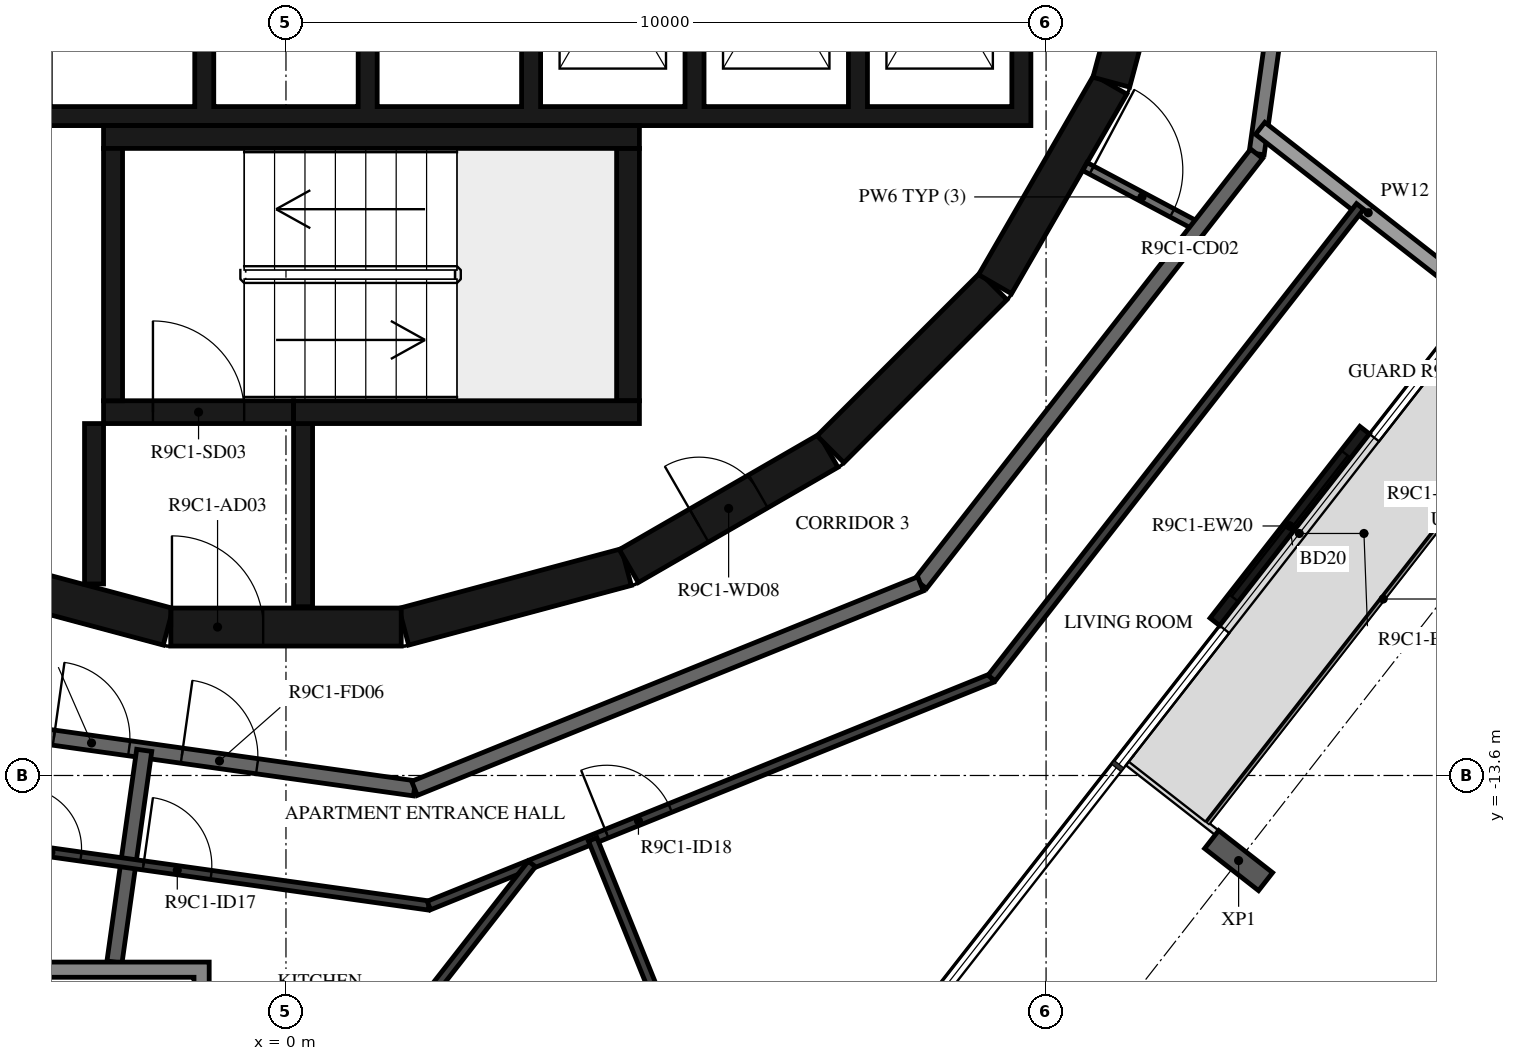
"""IFC4 building model, lengths in metres.
Left out: names, types, materials, properties, quantities, classifications, styles, units other than length and angle.
Written with IfcOpenShell. Run it as: python <this file> out.ifc"""

import sys

from ifc_helpers import new_model, si_unit, direction, frame, frame_2d, origin, origin_2d, place, context, subcontext, project, spatial, polyline, rectangle, i_section, outline, extrude, element, fill, save


model = new_model("IFC4")
c1 = context("Model", 3, precision=1e-05, world=origin(), true_north=direction((0.0, 1.0)))
c2 = subcontext(c1, "Body", "Model", "MODEL_VIEW")
j1 = project(units=[si_unit("LENGTHUNIT", "METRE"), si_unit("PLANEANGLEUNIT", "RADIAN")], contexts=[c1])
p1 = place(None, origin())
s1 = spatial("IfcSite", under=j1, at=p1, CompositionType="ELEMENT")
p2 = place(p1, origin())
s2 = spatial("IfcBuilding", under=s1, at=p2, CompositionType="ELEMENT")
p3 = place(p2, frame((0.0, 0.0, 357.5)))
s3 = spatial("IfcBuildingStorey", under=s2, at=p3, CompositionType="ELEMENT", Elevation=357.5)
p4 = place(p3, frame((12.533, -14.719, -0.38), z_axis=(0.0, 0.0, 1.0), x_axis=(-0.615661060634, -0.788011077599, 0.0)))
e1 = element("IfcColumn", 1, at=p4, inside=s3, PredefinedType="COLUMN", context=c2, shape_type="SweptSolid", body=[
    extrude(i_section(OverallWidth=0.3, OverallDepth=0.9, WebThickness=0.019, FlangeThickness=0.035, FilletRadius=0.03, at=origin_2d()), origin(), (0.0, 0.0, 1.0), 3.5),
])
p5 = place(p3, frame((12.221, -11.578, 0.0), z_axis=(0.0, 0.0, 1.0), x_axis=(0.615666248856, 0.788007024093, 0.0)))
e2 = element("IfcWall", 2, at=p5, inside=s3, PredefinedType="STANDARD", context=c2, shape_type="SweptSolid", body=[
    extrude(rectangle(XDim=3.2, YDim=0.16, at=frame_2d((1.6, 0.0))), origin(), (0.0, 0.0, 1.0), 3.12),
])
p6 = place(p5, frame((0.4, 0.0, 0.0)))
e3 = element("IfcOpeningElement", 3, at=p6, cuts=e2, PredefinedType="OPENING", context=c2, shape_type="SweptSolid", body=[
    extrude(rectangle(XDim=2.4, YDim=2.4, at=frame_2d((1.2, 1.2))), frame((0.0, 0.09, 0.0), z_axis=(0.0, -1.0, 0.0), x_axis=(1.0, 0.0, 0.0)), (0.0, 0.0, 1.0), 0.18),
])
p7 = place(p3, frame((1.55, -11.643, 0.0), z_axis=(0.0, 0.0, 1.0), x_axis=(0.965948410781, 0.258734743916, 0.0)))
e4 = element("IfcWall", 4, at=p7, inside=s3, PredefinedType="SHEAR", context=c2, shape_type="SweptSolid", body=[
    extrude(rectangle(XDim=3.033, YDim=0.5, at=frame_2d((1.516, 0.0))), origin(), (0.0, 0.0, 1.0), 3.12),
])
p8 = place(p3, frame((4.51, -10.845, 0.0), z_axis=(0.0, 0.0, 1.0), x_axis=(0.865975092491, 0.500087131594, 0.0)))
e5 = element("IfcWall", 5, at=p8, inside=s3, PredefinedType="SHEAR", context=c2, shape_type="SweptSolid", body=[
    extrude(rectangle(XDim=3.033, YDim=0.5, at=frame_2d((1.516, 0.0))), origin(), (0.0, 0.0, 1.0), 3.12),
])
p9 = place(p8, frame((1.066, 0.0, 0.0)))
e6 = element("IfcOpeningElement", 6, at=p9, cuts=e5, PredefinedType="OPENING", context=c2, shape_type="SweptSolid", body=[
    extrude(rectangle(XDim=0.9, YDim=2.1, at=frame_2d((0.45, 1.05))), frame((0.0, 0.26, 0.0), z_axis=(0.0, -1.0, 0.0), x_axis=(1.0, 0.0, 0.0)), (0.0, 0.0, 1.0), 0.52),
])
p10 = place(p3, frame((7.164, -9.308, 0.0), z_axis=(0.0, 0.0, 1.0), x_axis=(0.707106781187, 0.707106781187, 0.0)))
e7 = element("IfcWall", 7, at=p10, inside=s3, PredefinedType="SHEAR", context=c2, shape_type="SweptSolid", body=[
    extrude(rectangle(XDim=3.032, YDim=0.5, at=frame_2d((1.516, 0.0))), origin(), (0.0, 0.0, 1.0), 3.12),
])
for number, where, z_axis, x_axis in (
    (8, (9.329, -7.137, 0.0), (0.0, 0.0, 1.0), (0.5, 0.866, 0.0)),
    (9, (10.858, -4.479, 0.0), (0.0, 0.0, 1.0), (0.259, 0.966, 0.0)),
    (10, (-4.479, -10.858, 0.0), (0.0, 0.0, 1.0), (0.966, -0.259, 0.0)),
):
    element("IfcWall", number, at=place(p3, frame(where, z_axis=z_axis, x_axis=x_axis)), inside=s3, PredefinedType="SHEAR", context=c2, shape_type="SweptSolid", body=[
        extrude(rectangle(XDim=3.033, YDim=0.5, at=frame_2d((1.516, 0.0))), origin(), (0.0, 0.0, 1.0), 3.12),
    ])
p11 = place(p3, frame((-1.516, -11.647, 0.0), z_axis=(0.0, 0.0, 1.0), x_axis=(1.0, 0.0, 0.0)))
e11 = element("IfcWall", 11, at=p11, inside=s3, PredefinedType="SHEAR", context=c2, shape_type="SweptSolid", body=[
    extrude(rectangle(XDim=3.033, YDim=0.5, at=frame_2d((1.516, 0.0))), origin(), (0.0, 0.0, 1.0), 3.12),
])
p12 = place(p11, frame((0.016, 0.0, 0.0)))
e12 = element("IfcOpeningElement", 12, at=p12, cuts=e11, PredefinedType="OPENING", context=c2, shape_type="SweptSolid", body=[
    extrude(rectangle(XDim=1.2, YDim=2.1, at=frame_2d((0.6, 1.05))), frame((0.0, 0.26, 0.0), z_axis=(0.0, -1.0, 0.0), x_axis=(1.0, 0.0, 0.0)), (0.0, 0.0, 1.0), 0.52),
])
p13 = place(p3, frame((-2.275, -8.67, 0.0), z_axis=(0.0, 0.0, 1.0), x_axis=(0.0, 1.0, 0.0)))
e13 = element("IfcWall", 13, at=p13, inside=s3, PredefinedType="SHEAR", context=c2, shape_type="SweptSolid", body=[
    extrude(rectangle(XDim=3.32, YDim=0.25, at=frame_2d((1.66, 0.0))), origin(), (0.0, 0.0, 1.0), 3.12),
])
p14 = place(p3, frame((-2.4, -5.2, 0.0), z_axis=(0.0, 0.0, 1.0), x_axis=(1.0, 0.0, 0.0)))
e14 = element("IfcWall", 14, at=p14, inside=s3, PredefinedType="SHEAR", context=c2, shape_type="SweptSolid", body=[
    extrude(rectangle(XDim=7.05, YDim=0.3, at=frame_2d((3.525, 0.0))), origin(), (0.0, 0.0, 1.0), 3.12),
])
p15 = place(p3, frame((4.5, -8.67, 0.0), z_axis=(0.0, 0.0, 1.0), x_axis=(0.0, 1.0, 0.0)))
e15 = element("IfcWall", 15, at=p15, inside=s3, PredefinedType="SHEAR", context=c2, shape_type="SweptSolid", body=[
    extrude(rectangle(XDim=3.32, YDim=0.3, at=frame_2d((1.66, 0.0))), origin(), (0.0, 0.0, 1.0), 3.12),
])
p16 = place(p3, frame((0.1, -8.82, 0.0), z_axis=(0.0, 0.0, 1.0), x_axis=(1.0, 0.0, 0.0)))
e16 = element("IfcWall", 16, at=p16, inside=s3, PredefinedType="SHEAR", context=c2, shape_type="SweptSolid", body=[
    extrude(rectangle(XDim=4.55, YDim=0.3, at=frame_2d((2.275, 0.0))), origin(), (0.0, 0.0, 1.0), 3.12),
])
p17 = place(p3, frame((-2.4, -8.82, 0.0), z_axis=(0.0, 0.0, 1.0), x_axis=(1.0, 0.0, 0.0)))
e17 = element("IfcWall", 17, at=p17, inside=s3, PredefinedType="SHEAR", context=c2, shape_type="SweptSolid", body=[
    extrude(rectangle(XDim=2.5, YDim=0.3, at=frame_2d((1.25, 0.0))), origin(), (0.0, 0.0, 1.0), 3.12),
])
p18 = place(p17, frame((0.65, 0.0, 0.0)))
e18 = element("IfcOpeningElement", 18, at=p18, cuts=e17, PredefinedType="OPENING", context=c2, shape_type="SweptSolid", body=[
    extrude(rectangle(XDim=1.2, YDim=2.1, at=frame_2d((0.6, 1.05))), frame((0.0, 0.16, 0.0), z_axis=(0.0, -1.0, 0.0), x_axis=(1.0, 0.0, 0.0)), (0.0, 0.0, 1.0), 0.32),
])
p19 = place(p3, frame((-2.525, -8.97, 0.0), z_axis=(0.0, 0.0, 1.0), x_axis=(0.0, -1.0, 0.0)))
e19 = element("IfcWall", 19, at=p19, inside=s3, PredefinedType="SHEAR", context=c2, shape_type="SweptSolid", body=[
    extrude(rectangle(XDim=2.11, YDim=0.25, at=frame_2d((1.055, 0.0))), origin(), (0.0, 0.0, 1.0), 3.12),
])
p20 = place(p3, frame((0.225, -8.97, 0.0), z_axis=(0.0, 0.0, 1.0), x_axis=(0.0, -1.0, 0.0)))
e20 = element("IfcWall", 20, at=p20, inside=s3, PredefinedType="SHEAR", context=c2, shape_type="SweptSolid", body=[
    extrude(rectangle(XDim=2.41, YDim=0.25, at=frame_2d((1.205, 0.0))), origin(), (0.0, 0.0, 1.0), 3.12),
])
p21 = place(p3, origin())
e21 = element("IfcWall", 21, at=p21, inside=s3, PredefinedType="SHEAR", context=c2, shape_type="SweptSolid", body=[
    extrude(outline(polyline([(9.8, -5.05), (9.8, -4.8), (9.8, -1.9), (9.55, -1.9), (9.55, -4.8), (7.65, -4.8), (7.65, -1.9), (7.4, -1.9), (7.4, -4.8), (5.5, -4.8), (5.5, -1.9), (5.25, -1.9), (5.25, -4.8), (3.35, -4.8), (3.35, -1.9), (3.1, -1.9), (3.1, -4.8), (1.2, -4.8), (1.2, -1.9), (0.95, -1.9), (0.95, -4.8), (-0.95, -4.8), (-0.95, -1.9), (-1.2, -1.9), (-1.2, -4.8), (-3.1, -4.8), (-3.1, -1.9), (-3.35, -1.9), (-3.35, -4.8), (-5.25, -4.8), (-5.25, -1.9), (-5.5, -1.9), (-5.5, -4.8), (-9.55, -4.8), (-9.55, -1.9), (-9.8, -1.9), (-9.8, -4.8), (-9.8, -5.05), (9.8, -5.05)])), origin(), (0.0, 0.0, 1.0), 3.12),
])
p22 = place(p3, frame((10.511, -5.589, 0.0), z_axis=(0.0, 0.0, 1.0), x_axis=(0.882959677414, -0.469448834337, 0.0)))
e22 = element("IfcWall", 22, at=p22, inside=s3, PredefinedType="PARTITIONING", context=c2, shape_type="SweptSolid", body=[
    extrude(rectangle(XDim=1.702, YDim=0.12, at=frame_2d((0.851, 0.0))), origin(), (0.0, 0.0, 1.0), 3.12),
])
p23 = place(p22, frame((0.1, 0.0, 0.0)))
e23 = element("IfcOpeningElement", 23, at=p23, cuts=e22, PredefinedType="OPENING", context=c2, shape_type="SweptSolid", body=[
    extrude(rectangle(XDim=1.2, YDim=2.1, at=frame_2d((0.6, 1.05))), frame((0.0, 0.07, 0.0), z_axis=(0.0, -1.0, 0.0), x_axis=(1.0, 0.0, 0.0)), (0.0, 0.0, 1.0), 0.14),
])
p24 = place(p3, frame((12.77, -5.42, 0.0), z_axis=(0.0, 0.0, 1.0), x_axis=(0.139155334385, 0.990270565508, 0.0)))
e24 = element("IfcWall", 24, at=p24, inside=s3, PredefinedType="STANDARD", context=c2, shape_type="SweptSolid", body=[
    extrude(rectangle(XDim=7.181, YDim=0.2, at=frame_2d((3.59, 0.0))), origin(), (0.0, 0.0, 1.0), 3.12),
])
p25 = place(p24, frame((2.039, 0.0, 0.0)))
e25 = element("IfcOpeningElement", 25, at=p25, cuts=e24, PredefinedType="OPENING", context=c2, shape_type="SweptSolid", body=[
    extrude(rectangle(XDim=1.8, YDim=2.1, at=frame_2d((0.9, 1.05))), frame((0.0, 0.11, 0.0), z_axis=(0.0, -1.0, 0.0), x_axis=(1.0, 0.0, 0.0)), (0.0, 0.0, 1.0), 0.22),
])
p26 = place(p3, frame((8.349, -11.079, 0.0), z_axis=(0.0, 0.0, 1.0), x_axis=(0.615669112324, 0.78800478687, 0.0)))
e26 = element("IfcWall", 26, at=p26, inside=s3, PredefinedType="STANDARD", context=c2, shape_type="SweptSolid", body=[
    extrude(rectangle(XDim=7.181, YDim=0.2, at=frame_2d((3.591, 0.0))), origin(), (0.0, 0.0, 1.0), 3.12),
])
p27 = place(p3, frame((-5.42, -12.77, 0.0), z_axis=(0.0, 0.0, 1.0), x_axis=(0.990270565508, -0.139155334385, 0.0)))
e27 = element("IfcWall", 27, at=p27, inside=s3, PredefinedType="STANDARD", context=c2, shape_type="SweptSolid", body=[
    extrude(rectangle(XDim=7.181, YDim=0.2, at=frame_2d((3.59, 0.0))), origin(), (0.0, 0.0, 1.0), 3.12),
])
p28 = place(p27, frame((2.39, 0.0, 0.0)))
e28 = element("IfcOpeningElement", 28, at=p28, cuts=e27, PredefinedType="OPENING", context=c2, shape_type="SweptSolid", body=[
    extrude(rectangle(XDim=1.0, YDim=2.1, at=frame_2d((0.5, 1.05))), frame((0.0, 0.11, 0.0), z_axis=(0.0, -1.0, 0.0), x_axis=(1.0, 0.0, 0.0)), (0.0, 0.0, 1.0), 0.22),
])
p29 = place(p27, frame((4.091, 0.0, 0.0)))
e29 = element("IfcOpeningElement", 29, at=p29, cuts=e27, PredefinedType="OPENING", context=c2, shape_type="SweptSolid", body=[
    extrude(rectangle(XDim=1.0, YDim=2.1, at=frame_2d((0.5, 1.05))), frame((0.0, 0.11, 0.0), z_axis=(0.0, -1.0, 0.0), x_axis=(1.0, 0.0, 0.0)), (0.0, 0.0, 1.0), 0.22),
])
p30 = place(p3, frame((1.691, -13.769, 0.0), z_axis=(0.0, 0.0, 1.0), x_axis=(0.92717916932, 0.374618189599, 0.0)))
e30 = element("IfcWall", 30, at=p30, inside=s3, PredefinedType="STANDARD", context=c2, shape_type="SweptSolid", body=[
    extrude(rectangle(XDim=7.181, YDim=0.2, at=frame_2d((3.591, 0.0))), origin(), (0.0, 0.0, 1.0), 3.12),
])
p31 = place(p3, frame((12.817, -5.086, 0.0), z_axis=(0.0, 0.0, 1.0), x_axis=(0.787994616725, -0.615682129034, 0.0)))
e31 = element("IfcWall", 31, at=p31, inside=s3, PredefinedType="STANDARD", context=c2, shape_type="SweptSolid", body=[
    extrude(rectangle(XDim=3.607, YDim=0.2, at=frame_2d((1.804, 0.0))), origin(), (0.0, 0.0, 1.0), 2.73),
])
p32 = place(p3, frame((-2.256, -16.055, 0.0), z_axis=(0.0, 0.0, 1.0), x_axis=(0.139148428478, 0.990271535919, 0.0)))
e32 = element("IfcWall", 32, at=p32, inside=s3, PredefinedType="STANDARD", context=c2, shape_type="SweptSolid", body=[
    extrude(rectangle(XDim=2.812, YDim=0.2, at=frame_2d((1.406, 0.0))), origin(), (0.0, 0.0, 1.0), 3.12),
])
p33 = place(p3, frame((-3.688, -14.528, 0.0), z_axis=(0.0, 0.0, 1.0), x_axis=(0.990273413633, -0.139135064782, 0.0)))
e33 = element("IfcWall", 33, at=p33, inside=s3, PredefinedType="PARTITIONING", context=c2, shape_type="SweptSolid", body=[
    extrude(rectangle(XDim=5.622, YDim=0.12, at=frame_2d((2.811, 0.0))), origin(), (0.0, 0.0, 1.0), 3.12),
])
p34 = place(p33, frame((0.2, 0.0, 0.0)))
e34 = element("IfcOpeningElement", 34, at=p34, cuts=e33, PredefinedType="OPENING", context=c2, shape_type="SweptSolid", body=[
    extrude(rectangle(XDim=0.8, YDim=2.1, at=frame_2d((0.4, 1.05))), frame((0.0, 0.07, 0.0), z_axis=(0.0, -1.0, 0.0), x_axis=(1.0, 0.0, 0.0)), (0.0, 0.0, 1.0), 0.14),
])
p35 = place(p33, frame((1.83, 0.0, 0.0)))
e35 = element("IfcOpeningElement", 35, at=p35, cuts=e33, PredefinedType="OPENING", context=c2, shape_type="SweptSolid", body=[
    extrude(rectangle(XDim=0.9, YDim=2.1, at=frame_2d((0.45, 1.05))), frame((0.0, 0.07, 0.0), z_axis=(0.0, -1.0, 0.0), x_axis=(1.0, 0.0, 0.0)), (0.0, 0.0, 1.0), 0.14),
])
p36 = place(p3, frame((1.88, -15.311, 0.0), z_axis=(0.0, 0.0, 1.0), x_axis=(0.927184866592, 0.374604088557, 0.0)))
e36 = element("IfcWall", 36, at=p36, inside=s3, PredefinedType="PARTITIONING", context=c2, shape_type="SweptSolid", body=[
    extrude(rectangle(XDim=7.985, YDim=0.12, at=frame_2d((3.993, 0.0))), origin(), (0.0, 0.0, 1.0), 3.12),
])
p37 = place(p36, frame((2.524, 0.0, 0.0)))
e37 = element("IfcOpeningElement", 37, at=p37, cuts=e36, PredefinedType="OPENING", context=c2, shape_type="SweptSolid", body=[
    extrude(rectangle(XDim=0.9, YDim=2.1, at=frame_2d((0.45, 1.05))), frame((0.0, 0.07, 0.0), z_axis=(0.0, -1.0, 0.0), x_axis=(1.0, 0.0, 0.0)), (0.0, 0.0, 1.0), 0.14),
])
p38 = place(p3, frame((9.283, -12.319, 0.0), z_axis=(0.0, 0.0, 1.0), x_axis=(0.615666903036, 0.788006512985, 0.0)))
e38 = element("IfcWall", 38, at=p38, inside=s3, PredefinedType="PARTITIONING", context=c2, shape_type="SweptSolid", body=[
    extrude(rectangle(XDim=7.875, YDim=0.12, at=frame_2d((3.938, 0.0))), origin(), (0.0, 0.0, 1.0), 3.12),
])
p39 = place(p3, frame((-0.067, -18.99, 0.0), z_axis=(0.0, 0.0, 1.0), x_axis=(0.615678487989, 0.787997461562, 0.0)))
e39 = element("IfcWall", 39, at=p39, inside=s3, PredefinedType="PARTITIONING", context=c2, shape_type="SweptSolid", body=[
    extrude(rectangle(XDim=5.364, YDim=0.12, at=frame_2d((2.682, 0.0))), origin(), (0.0, 0.0, 1.0), 3.12),
])
p40 = place(p39, frame((0.2, 0.0, 0.0)))
e40 = element("IfcOpeningElement", 40, at=p40, cuts=e39, PredefinedType="OPENING", context=c2, shape_type="SweptSolid", body=[
    extrude(rectangle(XDim=0.8, YDim=2.1, at=frame_2d((0.4, 1.05))), frame((0.0, 0.07, 0.0), z_axis=(0.0, -1.0, 0.0), x_axis=(1.0, 0.0, 0.0)), (0.0, 0.0, 1.0), 0.14),
])
p41 = place(p3, frame((6.097, -19.546, 0.0), z_axis=(0.0, 0.0, 1.0), x_axis=(-0.374591330213, 0.927190021155, 0.0)))
e41 = element("IfcWall", 41, at=p41, inside=s3, PredefinedType="PARTITIONING", context=c2, shape_type="SweptSolid", body=[
    extrude(rectangle(XDim=5.507, YDim=0.12, at=frame_2d((2.753, 0.0))), origin(), (0.0, 0.0, 1.0), 3.12),
])
p42 = place(p41, frame((0.4, 0.0, 0.0)))
e42 = element("IfcOpeningElement", 42, at=p42, cuts=e41, PredefinedType="OPENING", context=c2, shape_type="SweptSolid", body=[
    extrude(rectangle(XDim=0.9, YDim=2.1, at=frame_2d((0.45, 1.05))), frame((0.0, 0.07, 0.0), z_axis=(0.0, -1.0, 0.0), x_axis=(1.0, 0.0, 0.0)), (0.0, 0.0, 1.0), 0.14),
])
p43 = place(p3, origin())
e43 = element("IfcWall", 43, at=p43, inside=s3, PredefinedType="STANDARD", context=c2, shape_type="SweptSolid", body=[
    extrude(outline(polyline([(-1.01, -16.055), (-1.01, -18.955), (-3.91, -18.955), (-3.91, -16.055), (-1.01, -16.055)]), holes=[polyline([(-3.71, -18.755), (-1.21, -18.755), (-1.21, -16.255), (-3.71, -16.255), (-3.71, -18.755)])]), origin(), (0.0, 0.0, 1.0), 3.12),
])
p44 = place(p6, origin())
e44 = element("IfcDoor", 44, at=p44, inside=s3, OperationType="DOUBLE_DOOR_SLIDING", PredefinedType="DOOR", context=c2, shape_type="SweptSolid", body=[
    extrude(rectangle(XDim=2.4, YDim=2.4, at=frame_2d((1.2, 1.2))), frame((0.0, 0.025, 0.0), z_axis=(0.0, -1.0, 0.0), x_axis=(1.0, 0.0, 0.0)), (0.0, 0.0, 1.0), 0.05),
])
fill(e3, e44)
p45 = place(p18, origin())
e45 = element("IfcDoor", 45, at=p45, inside=s3, OperationType="SINGLE_SWING_LEFT", PredefinedType="DOOR", context=c2, shape_type="SweptSolid", body=[
    extrude(rectangle(XDim=1.2, YDim=2.1, at=frame_2d((0.6, 1.05))), frame((0.0, 0.025, 0.0), z_axis=(0.0, -1.0, 0.0), x_axis=(1.0, 0.0, 0.0)), (0.0, 0.0, 1.0), 0.05),
])
fill(e18, e45)
p46 = place(p12, origin())
e46 = element("IfcDoor", 46, at=p46, inside=s3, OperationType="SINGLE_SWING_RIGHT", PredefinedType="DOOR", context=c2, shape_type="SweptSolid", body=[
    extrude(rectangle(XDim=1.2, YDim=2.1, at=frame_2d((0.6, 1.05))), frame((0.0, 0.025, 0.0), z_axis=(0.0, -1.0, 0.0), x_axis=(1.0, 0.0, 0.0)), (0.0, 0.0, 1.0), 0.05),
])
fill(e12, e46)
p47 = place(p9, origin())
e47 = element("IfcDoor", 47, at=p47, inside=s3, OperationType="SINGLE_SWING_RIGHT", PredefinedType="DOOR", context=c2, shape_type="SweptSolid", body=[
    extrude(rectangle(XDim=0.9, YDim=2.1, at=frame_2d((0.45, 1.05))), frame((0.0, 0.025, 0.0), z_axis=(0.0, -1.0, 0.0), x_axis=(1.0, 0.0, 0.0)), (0.0, 0.0, 1.0), 0.05),
])
fill(e6, e47)
p48 = place(p28, origin())
e48 = element("IfcDoor", 48, at=p48, inside=s3, OperationType="SINGLE_SWING_RIGHT", PredefinedType="DOOR", context=c2, shape_type="SweptSolid", body=[
    extrude(rectangle(XDim=1.0, YDim=2.1, at=frame_2d((0.5, 1.05))), frame((0.0, 0.025, 0.0), z_axis=(0.0, -1.0, 0.0), x_axis=(1.0, 0.0, 0.0)), (0.0, 0.0, 1.0), 0.05),
])
fill(e28, e48)
p49 = place(p34, origin())
e49 = element("IfcDoor", 49, at=p49, inside=s3, OperationType="SINGLE_SWING_RIGHT", PredefinedType="DOOR", context=c2, shape_type="SweptSolid", body=[
    extrude(rectangle(XDim=0.8, YDim=2.1, at=frame_2d((0.4, 1.05))), frame((0.0, 0.025, 0.0), z_axis=(0.0, -1.0, 0.0), x_axis=(1.0, 0.0, 0.0)), (0.0, 0.0, 1.0), 0.05),
])
fill(e34, e49)
p50 = place(p29, origin())
e50 = element("IfcDoor", 50, at=p50, inside=s3, OperationType="SINGLE_SWING_RIGHT", PredefinedType="DOOR", context=c2, shape_type="SweptSolid", body=[
    extrude(rectangle(XDim=1.0, YDim=2.1, at=frame_2d((0.5, 1.05))), frame((0.0, 0.025, 0.0), z_axis=(0.0, -1.0, 0.0), x_axis=(1.0, 0.0, 0.0)), (0.0, 0.0, 1.0), 0.05),
])
fill(e29, e50)
p51 = place(p35, origin())
e51 = element("IfcDoor", 51, at=p51, inside=s3, OperationType="SINGLE_SWING_RIGHT", PredefinedType="DOOR", context=c2, shape_type="SweptSolid", body=[
    extrude(rectangle(XDim=0.9, YDim=2.1, at=frame_2d((0.45, 1.05))), frame((0.0, 0.025, 0.0), z_axis=(0.0, -1.0, 0.0), x_axis=(1.0, 0.0, 0.0)), (0.0, 0.0, 1.0), 0.05),
])
fill(e35, e51)
p52 = place(p37, origin())
e52 = element("IfcDoor", 52, at=p52, inside=s3, OperationType="SINGLE_SWING_LEFT", PredefinedType="DOOR", context=c2, shape_type="SweptSolid", body=[
    extrude(rectangle(XDim=0.9, YDim=2.1, at=frame_2d((0.45, 1.05))), frame((0.0, 0.025, 0.0), z_axis=(0.0, -1.0, 0.0), x_axis=(1.0, 0.0, 0.0)), (0.0, 0.0, 1.0), 0.05),
])
fill(e37, e52)
p53 = place(p23, origin())
e53 = element("IfcDoor", 53, at=p53, inside=s3, OperationType="DOUBLE_DOOR_SINGLE_SWING", PredefinedType="DOOR", context=c2, shape_type="SweptSolid", body=[
    extrude(rectangle(XDim=1.2, YDim=2.1, at=frame_2d((0.6, 1.05))), frame((0.0, 0.025, 0.0), z_axis=(0.0, -1.0, 0.0), x_axis=(1.0, 0.0, 0.0)), (0.0, 0.0, 1.0), 0.05),
])
fill(e23, e53)
save(model, sys.argv[1])
